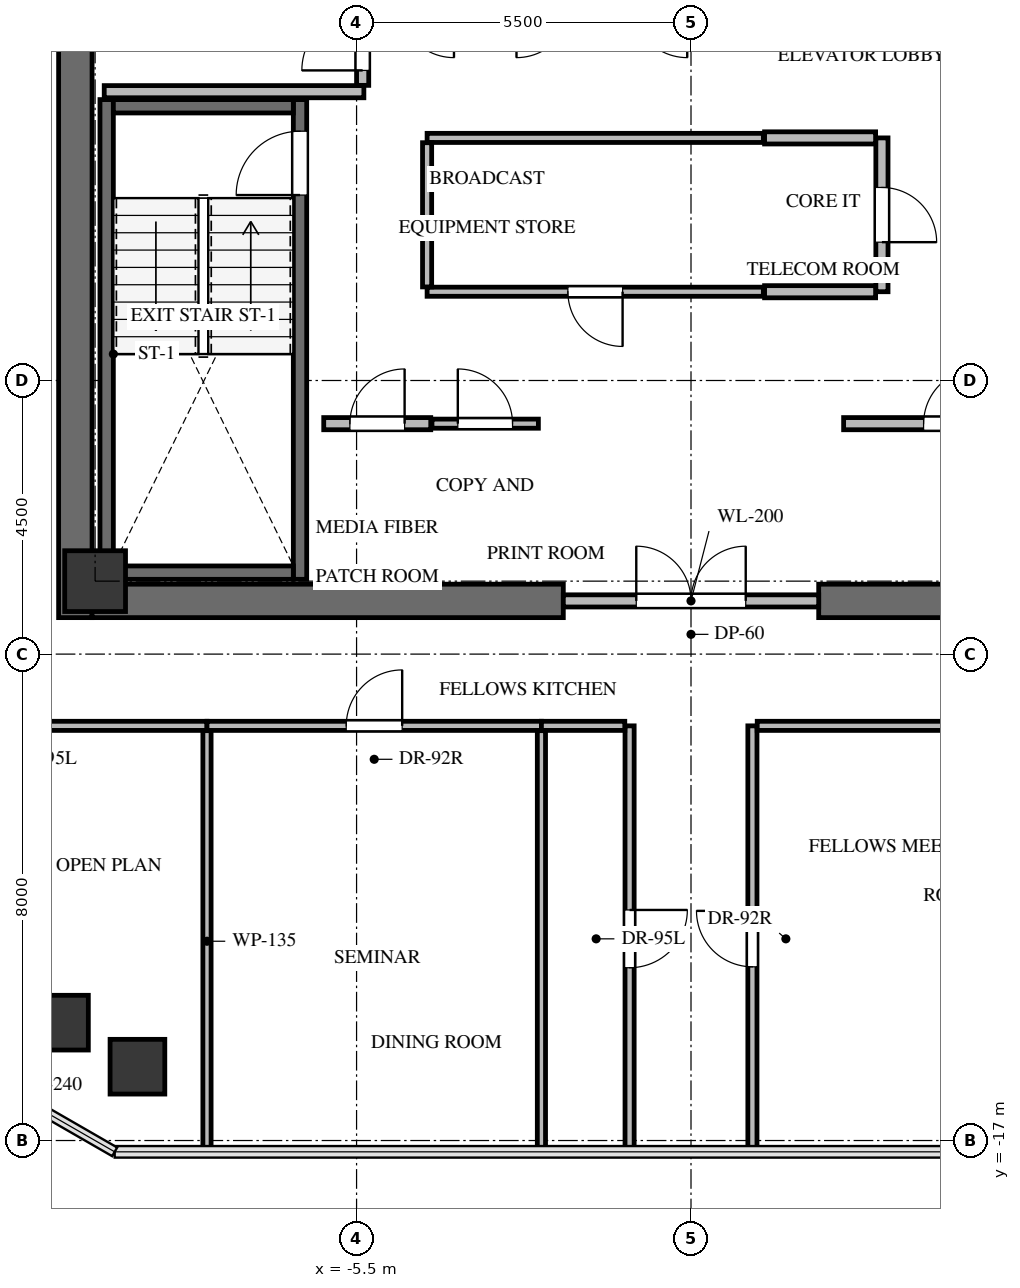
"""IFC4 building model, lengths in metres.
Left out: names, types, materials, properties, quantities, classifications, styles, units other than length and angle.
Written with IfcOpenShell. Run it as: python <this file> out.ifc"""

import sys

from ifc_helpers import new_model, si_unit, direction, frame, frame_2d, origin, origin_2d, place, context, subcontext, project, spatial, rectangle, extrude, source, transform, mapped, element, fill, save


model = new_model("IFC4")
c1 = context("Model", 3, precision=1e-05, world=origin(), true_north=direction((0.0, 1.0)))
c2 = subcontext(c1, "Body", "Model", "MODEL_VIEW")
j1 = project(units=[si_unit("LENGTHUNIT", "METRE"), si_unit("PLANEANGLEUNIT", "RADIAN")], contexts=[c1])
p1 = place(None, origin())
s1 = spatial("IfcSite", under=j1, at=p1, CompositionType="ELEMENT")
p2 = place(p1, origin())
s2 = spatial("IfcBuilding", under=s1, at=p2, CompositionType="ELEMENT")
p3 = place(p2, frame((0.0, 0.0, 258.1)))
s3 = spatial("IfcBuildingStorey", under=s2, at=p3, CompositionType="ELEMENT", Elevation=258.1)
p4 = place(p3, frame((-10.125, -8.4, 0.0), z_axis=(0.0, 0.0, 1.0), x_axis=(0.0, 1.0, 0.0)))
e1 = element("IfcWall", 1, at=p4, inside=s3, PredefinedType="SHEAR", context=c2, shape_type="SweptSolid", body=[
    extrude(rectangle(XDim=16.8, YDim=0.55, at=frame_2d((8.4, 0.0))), origin(), (0.0, 0.0, 1.0), 3.4),
])
for number, where, z_axis, x_axis in (
    (2, (-9.85, -8.125, 0.0), (0.0, 0.0, 1.0), (1.0, 0.0, 0.0)),
    (3, (2.1, -8.125, 0.0), (0.0, 0.0, 1.0), (1.0, 0.0, 0.0)),
):
    element("IfcWall", number, at=place(p3, frame(where, z_axis=z_axis, x_axis=x_axis)), inside=s3, PredefinedType="SHEAR", context=c2, shape_type="SweptSolid", body=[
        extrude(rectangle(XDim=7.75, YDim=0.55, at=frame_2d((3.875, 0.0))), origin(), (0.0, 0.0, 1.0), 3.4),
    ])
p5 = place(p3, frame((-6.43, -7.77, -0.24), z_axis=(0.0, 0.0, 1.0), x_axis=(0.0, 1.0, 0.0)))
e4 = element("IfcWall", 4, at=p5, inside=s3, PredefinedType="SHEAR", context=c2, shape_type="SweptSolid", body=[
    extrude(rectangle(XDim=7.89, YDim=0.22, at=frame_2d((3.945, 0.0))), origin(), (0.0, 0.0, 1.0), 3.4),
])
p6 = place(p5, frame((6.32, 0.0, 0.0)))
e5 = element("IfcOpeningElement", 5, at=p6, cuts=e4, PredefinedType="OPENING", context=c2, shape_type="SweptSolid", body=[
    extrude(rectangle(XDim=1.05, YDim=2.15, at=frame_2d((0.525, 1.075))), frame((0.0, 0.12, 0.0), z_axis=(0.0, -1.0, 0.0), x_axis=(1.0, 0.0, 0.0)), (0.0, 0.0, 1.0), 0.24),
])
p7 = place(p3, frame((-9.61, 0.12, -0.24), z_axis=(0.0, 0.0, 1.0), x_axis=(0.0, -1.0, 0.0)))
e6 = element("IfcWall", 6, at=p7, inside=s3, PredefinedType="SHEAR", context=c2, shape_type="SweptSolid", body=[
    extrude(rectangle(XDim=7.89, YDim=0.22, at=frame_2d((3.945, 0.0))), origin(), (0.0, 0.0, 1.0), 3.4),
])
for number, where, z_axis, x_axis in (
    (7, (-9.5, -7.66, -0.24), (0.0, 0.0, 1.0), (1.0, 0.0, 0.0)),
    (8, (-6.54, 0.01, -0.24), (0.0, 0.0, 1.0), (-1.0, 0.0, 0.0)),
):
    element("IfcWall", number, at=place(p3, frame(where, z_axis=z_axis, x_axis=x_axis)), inside=s3, PredefinedType="SHEAR", context=c2, shape_type="SweptSolid", body=[
        extrude(rectangle(XDim=2.96, YDim=0.22, at=frame_2d((1.48, 0.0))), origin(), (0.0, 0.0, 1.0), 3.4),
    ])
m1 = source(origin(), c2, "Body", "SweptSolid", [
    extrude(rectangle(XDim=1.0, YDim=1.0, at=origin_2d()), origin(), (0.0, 0.0, 1.0), 3.4),
])
p8 = place(p3, frame((-9.8, -7.8, -0.24), z_axis=(0.0, 0.0, 1.0), x_axis=(1.0, 0.0, 0.0)))
e9 = element("IfcColumn", 9, at=p8, inside=s3, PredefinedType="COLUMN", context=c2, shape_type="MappedRepresentation", body=[
    mapped(m1, transform((0.0, 0.0, 0.0), x_axis=(1.0, 0.0, 0.0), y_axis=(0.0, 1.0, 0.0), z_axis=(0.0, 0.0, 1.0), scale=1.0)),
])
m2 = source(origin(), c2, "Body", "SweptSolid", [
    extrude(rectangle(XDim=0.9, YDim=0.9, at=origin_2d()), origin(), (0.0, 0.0, 1.0), 3.4),
])
for number, where, z_axis, x_axis in (
    (10, (-10.361, -15.062, -0.24), (0.0, 0.0, 1.0), (1.0, 0.0, 0.0)),
    (11, (-9.104, -15.786, -0.24), (0.0, 0.0, 1.0), (1.0, 0.0, 0.0)),
):
    element("IfcColumn", number, at=place(p3, frame(where, z_axis=z_axis, x_axis=x_axis)), inside=s3, PredefinedType="COLUMN", context=c2, shape_type="MappedRepresentation", body=[
        mapped(m2, transform((0.0, 0.0, 0.0), x_axis=(1.0, 0.0, 0.0), y_axis=(0.0, 1.0, 0.0), z_axis=(0.0, 0.0, 1.0), scale=1.0)),
    ])
p9 = place(p3, frame((-2.1, -8.125, 0.0), z_axis=(0.0, 0.0, 1.0), x_axis=(1.0, 0.0, 0.0)))
e12 = element("IfcWall", 12, at=p9, inside=s3, PredefinedType="SOLIDWALL", context=c2, shape_type="SweptSolid", body=[
    extrude(rectangle(XDim=4.2, YDim=0.2, at=frame_2d((2.1, 0.0))), origin(), (0.0, 0.0, 1.0), 3.145),
])
p10 = place(p9, frame((1.2, 0.0, 0.0)))
e13 = element("IfcOpeningElement", 13, at=p10, cuts=e12, PredefinedType="OPENING", context=c2, shape_type="SweptSolid", body=[
    extrude(rectangle(XDim=1.8, YDim=2.15, at=frame_2d((0.9, 1.075))), frame((0.0, 0.11, 0.0), z_axis=(0.0, -1.0, 0.0), x_axis=(1.0, 0.0, 0.0)), (0.0, 0.0, 1.0), 0.22),
])
p11 = place(p3, frame((-9.65, 0.25, 0.0), z_axis=(0.0, 0.0, 1.0), x_axis=(1.0, 0.0, 0.0)))
e14 = element("IfcWall", 14, at=p11, inside=s3, PredefinedType="SOLIDWALL", context=c2, shape_type="SweptSolid", body=[
    extrude(rectangle(XDim=4.27, YDim=0.2, at=frame_2d((2.135, 0.0))), origin(), (0.0, 0.0, 1.0), 3.145),
])
p12 = place(p3, frame((-5.4, 0.354, 0.0), z_axis=(0.0, 0.0, 1.0), x_axis=(0.0, 1.0, 0.0)))
e15 = element("IfcWall", 15, at=p12, inside=s3, PredefinedType="SOLIDWALL", context=c2, shape_type="SweptSolid", body=[
    extrude(rectangle(XDim=4.026, YDim=0.2, at=frame_2d((2.013, 0.0))), origin(), (0.0, 0.0, 1.0), 3.145),
])
p13 = place(p12, frame((0.246, 0.0, 0.0)))
e16 = element("IfcOpeningElement", 16, at=p13, cuts=e15, PredefinedType="OPENING", context=c2, shape_type="SweptSolid", body=[
    extrude(rectangle(XDim=1.0, YDim=2.15, at=frame_2d((0.5, 1.075))), frame((0.0, 0.11, 0.0), z_axis=(0.0, -1.0, 0.0), x_axis=(1.0, 0.0, 0.0)), (0.0, 0.0, 1.0), 0.22),
])
p14 = place(p3, frame((-6.04, -5.21, 0.0), z_axis=(0.0, 0.0, 1.0), x_axis=(1.0, 0.0, 0.0)))
e17 = element("IfcWall", 17, at=p14, inside=s3, PredefinedType="SOLIDWALL", context=c2, shape_type="SweptSolid", body=[
    extrude(rectangle(XDim=1.76, YDim=0.2, at=frame_2d((0.88, 0.0))), origin(), (0.0, 0.0, 1.0), 3.145),
])
p15 = place(p14, frame((0.43, 0.0, 0.0)))
e18 = element("IfcOpeningElement", 18, at=p15, cuts=e17, PredefinedType="OPENING", context=c2, shape_type="SweptSolid", body=[
    extrude(rectangle(XDim=0.9, YDim=2.05, at=frame_2d((0.45, 1.025))), frame((0.0, 0.11, 0.0), z_axis=(0.0, -1.0, 0.0), x_axis=(1.0, 0.0, 0.0)), (0.0, 0.0, 1.0), 0.22),
])
p16 = place(p3, frame((-4.26, -5.21, 0.0), z_axis=(0.0, 0.0, 1.0), x_axis=(1.0, 0.0, 0.0)))
e19 = element("IfcWall", 19, at=p16, inside=s3, PredefinedType="PARTITIONING", context=c2, shape_type="SweptSolid", body=[
    extrude(rectangle(XDim=1.75, YDim=0.15, at=frame_2d((0.875, 0.0))), origin(), (0.0, 0.0, 1.0), 3.145),
])
p17 = place(p16, frame((0.425, 0.0, 0.0)))
e20 = element("IfcOpeningElement", 20, at=p17, cuts=e19, PredefinedType="OPENING", context=c2, shape_type="SweptSolid", body=[
    extrude(rectangle(XDim=0.9, YDim=2.05, at=frame_2d((0.45, 1.025))), frame((0.0, 0.085, 0.0), z_axis=(0.0, -1.0, 0.0), x_axis=(1.0, 0.0, 0.0)), (0.0, 0.0, 1.0), 0.17),
])
p18 = place(p3, frame((2.51, -5.21, 0.0), z_axis=(0.0, 0.0, 1.0), x_axis=(1.0, 0.0, 0.0)))
e21 = element("IfcWall", 21, at=p18, inside=s3, PredefinedType="SOLIDWALL", context=c2, shape_type="SweptSolid", body=[
    extrude(rectangle(XDim=3.53, YDim=0.2, at=frame_2d((1.765, 0.0))), origin(), (0.0, 0.0, 1.0), 3.145),
])
p19 = place(p18, frame((1.315, 0.0, 0.0)))
e22 = element("IfcOpeningElement", 22, at=p19, cuts=e21, PredefinedType="OPENING", context=c2, shape_type="SweptSolid", body=[
    extrude(rectangle(XDim=0.9, YDim=2.05, at=frame_2d((0.45, 1.025))), frame((0.0, 0.11, 0.0), z_axis=(0.0, -1.0, 0.0), x_axis=(1.0, 0.0, 0.0)), (0.0, 0.0, 1.0), 0.22),
])
p20 = place(p3, frame((1.19, -3.04, 0.0), z_axis=(0.0, 0.0, 1.0), x_axis=(-1.0, 0.0, 0.0)))
e23 = element("IfcWall", 23, at=p20, inside=s3, PredefinedType="PARTITIONING", context=c2, shape_type="SweptSolid", body=[
    extrude(rectangle(XDim=5.53, YDim=0.15, at=frame_2d((2.765, 0.0))), origin(), (0.0, 0.0, 1.0), 3.145),
])
p21 = place(p20, frame((2.315, 0.0, 0.0)))
e24 = element("IfcOpeningElement", 24, at=p21, cuts=e23, PredefinedType="OPENING", context=c2, shape_type="SweptSolid", body=[
    extrude(rectangle(XDim=0.9, YDim=2.05, at=frame_2d((0.45, 1.025))), frame((0.0, 0.085, 0.0), z_axis=(0.0, -1.0, 0.0), x_axis=(1.0, 0.0, 0.0)), (0.0, 0.0, 1.0), 0.17),
])
p22 = place(p3, frame((-4.34, -0.51, 0.0), z_axis=(0.0, 0.0, 1.0), x_axis=(1.0, 0.0, 0.0)))
e25 = element("IfcWall", 25, at=p22, inside=s3, PredefinedType="PARTITIONING", context=c2, shape_type="SweptSolid", body=[
    extrude(rectangle(XDim=5.53, YDim=0.15, at=frame_2d((2.765, 0.0))), origin(), (0.0, 0.0, 1.0), 3.145),
])
p23 = place(p3, frame((-4.34, -2.961, 0.0), z_axis=(0.0, 0.0, 1.0), x_axis=(0.0, 1.0, 0.0)))
e26 = element("IfcWall", 26, at=p23, inside=s3, PredefinedType="PARTITIONING", context=c2, shape_type="SweptSolid", body=[
    extrude(rectangle(XDim=2.372, YDim=0.15, at=frame_2d((1.186, 0.0))), origin(), (0.0, 0.0, 1.0), 3.145),
])
p24 = place(p3, frame((3.14, -0.51, 0.0), z_axis=(0.0, 0.0, 1.0), x_axis=(0.0, -1.0, 0.0)))
e27 = element("IfcWall", 27, at=p24, inside=s3, PredefinedType="SOLIDWALL", context=c2, shape_type="SweptSolid", body=[
    extrude(rectangle(XDim=2.53, YDim=0.2, at=frame_2d((1.265, 0.0))), origin(), (0.0, 0.0, 1.0), 3.145),
])
p25 = place(p24, frame((0.815, 0.0, 0.0)))
e28 = element("IfcOpeningElement", 28, at=p25, cuts=e27, PredefinedType="OPENING", context=c2, shape_type="SweptSolid", body=[
    extrude(rectangle(XDim=0.9, YDim=2.05, at=frame_2d((0.45, 1.025))), frame((0.0, 0.11, 0.0), z_axis=(0.0, -1.0, 0.0), x_axis=(1.0, 0.0, 0.0)), (0.0, 0.0, 1.0), 0.22),
])
for number, where, z_axis, x_axis in (
    (29, (3.036, -3.04, 0.0), (0.0, 0.0, 1.0), (-1.0, 0.0, 0.0)),
    (30, (1.21, -0.51, 0.0), (0.0, 0.0, 1.0), (1.0, 0.0, 0.0)),
):
    element("IfcWall", number, at=place(p3, frame(where, z_axis=z_axis, x_axis=x_axis)), inside=s3, PredefinedType="SOLIDWALL", context=c2, shape_type="SweptSolid", body=[
        extrude(rectangle(XDim=1.826, YDim=0.2, at=frame_2d((0.913, 0.0))), origin(), (0.0, 0.0, 1.0), 3.145),
    ])
p26 = place(p3, frame((-12.39, -10.18, 0.0), z_axis=(0.0, 0.0, 1.0), x_axis=(1.0, 0.0, 0.0)))
e31 = element("IfcWall", 31, at=p26, inside=s3, PredefinedType="PARTITIONING", context=c2, shape_type="SweptSolid", body=[
    extrude(rectangle(XDim=4.43, YDim=0.15, at=frame_2d((2.215, 0.0))), origin(), (0.0, 0.0, 1.0), 3.145),
])
p27 = place(p26, frame((0.35, 0.0, 0.0)))
e32 = element("IfcOpeningElement", 32, at=p27, cuts=e31, PredefinedType="OPENING", context=c2, shape_type="SweptSolid", body=[
    extrude(rectangle(XDim=0.95, YDim=2.1, at=frame_2d((0.475, 1.05))), frame((0.0, 0.085, 0.0), z_axis=(0.0, -1.0, 0.0), x_axis=(1.0, 0.0, 0.0)), (0.0, 0.0, 1.0), 0.17),
])
p28 = place(p3, frame((-7.96, -10.18, 0.0), z_axis=(0.0, 0.0, 1.0), x_axis=(1.0, 0.0, 0.0)))
e33 = element("IfcWall", 33, at=p28, inside=s3, PredefinedType="PARTITIONING", context=c2, shape_type="SweptSolid", body=[
    extrude(rectangle(XDim=5.5, YDim=0.15, at=frame_2d((2.75, 0.0))), origin(), (0.0, 0.0, 1.0), 2.401),
])
p29 = place(p28, frame((2.29, 0.0, 0.0)))
e34 = element("IfcOpeningElement", 34, at=p29, cuts=e33, PredefinedType="OPENING", context=c2, shape_type="SweptSolid", body=[
    extrude(rectangle(XDim=0.92, YDim=2.1, at=frame_2d((0.46, 1.05))), frame((0.0, 0.085, 0.0), z_axis=(0.0, -1.0, 0.0), x_axis=(1.0, 0.0, 0.0)), (0.0, 0.0, 1.0), 0.17),
])
p30 = place(p3, frame((-1.01, -10.18, 0.0), z_axis=(0.0, 0.0, 1.0), x_axis=(0.0, -1.0, 0.0)))
e35 = element("IfcWall", 35, at=p30, inside=s3, PredefinedType="PARTITIONING", context=c2, shape_type="SweptSolid", body=[
    extrude(rectangle(XDim=7.006, YDim=0.15, at=frame_2d((3.503, 0.0))), origin(), (0.0, 0.0, 1.0), 2.499),
])
p31 = place(p30, frame((3.028, 0.0, 0.0)))
e36 = element("IfcOpeningElement", 36, at=p31, cuts=e35, PredefinedType="OPENING", context=c2, shape_type="SweptSolid", body=[
    extrude(rectangle(XDim=0.95, YDim=2.1, at=frame_2d((0.475, 1.05))), frame((0.0, 0.085, 0.0), z_axis=(0.0, -1.0, 0.0), x_axis=(1.0, 0.0, 0.0)), (0.0, 0.0, 1.0), 0.17),
])
p32 = place(p3, frame((-2.46, -10.18, 0.0), z_axis=(0.0, 0.0, 1.0), x_axis=(1.0, 0.0, 0.0)))
e37 = element("IfcWall", 37, at=p32, inside=s3, PredefinedType="PARTITIONING", context=c2, shape_type="SweptSolid", body=[
    extrude(rectangle(XDim=1.371, YDim=0.15, at=frame_2d((0.686, 0.0))), origin(), (0.0, 0.0, 1.0), 3.145),
])
p33 = place(p3, frame((1.01, -17.186, 0.0), z_axis=(0.0, 0.0, 1.0), x_axis=(0.0, 1.0, 0.0)))
e38 = element("IfcWall", 38, at=p33, inside=s3, PredefinedType="PARTITIONING", context=c2, shape_type="SweptSolid", body=[
    extrude(rectangle(XDim=7.006, YDim=0.15, at=frame_2d((3.503, 0.0))), origin(), (0.0, 0.0, 1.0), 2.499),
])
p34 = place(p33, frame((3.043, 0.0, 0.0)))
e39 = element("IfcOpeningElement", 39, at=p34, cuts=e38, PredefinedType="OPENING", context=c2, shape_type="SweptSolid", body=[
    extrude(rectangle(XDim=0.92, YDim=2.1, at=frame_2d((0.46, 1.05))), frame((0.0, 0.085, 0.0), z_axis=(0.0, -1.0, 0.0), x_axis=(1.0, 0.0, 0.0)), (0.0, 0.0, 1.0), 0.17),
])
p35 = place(p3, frame((1.089, -10.18, 0.0), z_axis=(0.0, 0.0, 1.0), x_axis=(1.0, 0.0, 0.0)))
e40 = element("IfcWall", 40, at=p35, inside=s3, PredefinedType="PARTITIONING", context=c2, shape_type="SweptSolid", body=[
    extrude(rectangle(XDim=5.451, YDim=0.15, at=frame_2d((2.726, 0.0))), origin(), (0.0, 0.0, 1.0), 2.401),
])
p36 = place(p3, frame((-7.96, -10.259, 0.0), z_axis=(0.0, 0.0, 1.0), x_axis=(0.0, -1.0, 0.0)))
e41 = element("IfcWall", 41, at=p36, inside=s3, PredefinedType="PARTITIONING", context=c2, shape_type="SweptSolid", body=[
    extrude(rectangle(XDim=6.927, YDim=0.135, at=frame_2d((3.463, 0.0))), origin(), (0.0, 0.0, 1.0), 2.401),
])
p37 = place(p3, frame((-2.46, -10.259, 0.0), z_axis=(0.0, 0.0, 1.0), x_axis=(0.0, -1.0, 0.0)))
e42 = element("IfcWall", 42, at=p37, inside=s3, PredefinedType="PARTITIONING", context=c2, shape_type="SweptSolid", body=[
    extrude(rectangle(XDim=6.927, YDim=0.135, at=frame_2d((3.463, 0.0))), origin(), (0.0, 0.0, 1.0), 2.499),
])
m3 = source(origin(), c2, "Body", "SweptSolid", [
    extrude(rectangle(XDim=1.05, YDim=2.15, at=frame_2d((0.525, 1.075))), frame((0.0, 0.025, 0.0), z_axis=(0.0, -1.0, 0.0), x_axis=(1.0, 0.0, 0.0)), (0.0, 0.0, 1.0), 0.05),
])
p38 = place(p6, origin())
e43 = element("IfcDoor", 43, at=p38, inside=s3, OperationType="SINGLE_SWING_LEFT", PredefinedType="DOOR", context=c2, shape_type="MappedRepresentation", body=[
    mapped(m3, transform((0.0, 0.0, 0.0), x_axis=(1.0, 0.0, 0.0), y_axis=(0.0, 1.0, 0.0), z_axis=(0.0, 0.0, 1.0), scale=1.0)),
])
fill(e5, e43)
m4 = source(origin(), c2, "Body", "SweptSolid", [
    extrude(rectangle(XDim=1.8, YDim=2.15, at=frame_2d((0.9, 1.075))), frame((0.0, 0.025, 0.0), z_axis=(0.0, -1.0, 0.0), x_axis=(1.0, 0.0, 0.0)), (0.0, 0.0, 1.0), 0.05),
])
p39 = place(p10, origin())
e44 = element("IfcDoor", 44, at=p39, inside=s3, OperationType="DOUBLE_DOOR_SINGLE_SWING", PredefinedType="DOOR", context=c2, shape_type="MappedRepresentation", body=[
    mapped(m4, transform((0.0, 0.0, 0.0), x_axis=(1.0, 0.0, 0.0), y_axis=(0.0, 1.0, 0.0), z_axis=(0.0, 0.0, 1.0), scale=1.0)),
])
fill(e13, e44)
m5 = source(origin(), c2, "Body", "SweptSolid", [
    extrude(rectangle(XDim=1.0, YDim=2.15, at=frame_2d((0.5, 1.075))), frame((0.0, 0.025, 0.0), z_axis=(0.0, -1.0, 0.0), x_axis=(1.0, 0.0, 0.0)), (0.0, 0.0, 1.0), 0.05),
])
p40 = place(p13, origin())
e45 = element("IfcDoor", 45, at=p40, inside=s3, OperationType="SINGLE_SWING_LEFT", PredefinedType="DOOR", context=c2, shape_type="MappedRepresentation", body=[
    mapped(m5, transform((0.0, 0.0, 0.0), x_axis=(1.0, 0.0, 0.0), y_axis=(0.0, 1.0, 0.0), z_axis=(0.0, 0.0, 1.0), scale=1.0)),
])
fill(e16, e45)
m6 = source(origin(), c2, "Body", "SweptSolid", [
    extrude(rectangle(XDim=0.9, YDim=2.05, at=frame_2d((0.45, 1.025))), frame((0.0, 0.025, 0.0), z_axis=(0.0, -1.0, 0.0), x_axis=(1.0, 0.0, 0.0)), (0.0, 0.0, 1.0), 0.05),
])
p41 = place(p15, origin())
e46 = element("IfcDoor", 46, at=p41, inside=s3, OperationType="SINGLE_SWING_RIGHT", PredefinedType="DOOR", context=c2, shape_type="MappedRepresentation", body=[
    mapped(m6, transform((0.0, 0.0, 0.0), x_axis=(1.0, 0.0, 0.0), y_axis=(0.0, 1.0, 0.0), z_axis=(0.0, 0.0, 1.0), scale=1.0)),
])
fill(e18, e46)
m7 = source(origin(), c2, "Body", "SweptSolid", [
    extrude(rectangle(XDim=0.9, YDim=2.05, at=frame_2d((0.45, 1.025))), frame((0.0, 0.025, 0.0), z_axis=(0.0, -1.0, 0.0), x_axis=(1.0, 0.0, 0.0)), (0.0, 0.0, 1.0), 0.05),
])
p42 = place(p17, origin())
e47 = element("IfcDoor", 47, at=p42, inside=s3, OperationType="SINGLE_SWING_LEFT", PredefinedType="DOOR", context=c2, shape_type="MappedRepresentation", body=[
    mapped(m7, transform((0.0, 0.0, 0.0), x_axis=(1.0, 0.0, 0.0), y_axis=(0.0, 1.0, 0.0), z_axis=(0.0, 0.0, 1.0), scale=1.0)),
])
fill(e20, e47)
p43 = place(p19, origin())
e48 = element("IfcDoor", 48, at=p43, inside=s3, OperationType="SINGLE_SWING_RIGHT", PredefinedType="DOOR", context=c2, shape_type="MappedRepresentation", body=[
    mapped(m6, transform((0.0, 0.0, 0.0), x_axis=(1.0, 0.0, 0.0), y_axis=(0.0, 1.0, 0.0), z_axis=(0.0, 0.0, 1.0), scale=1.0)),
])
fill(e22, e48)
p44 = place(p21, origin())
e49 = element("IfcDoor", 49, at=p44, inside=s3, OperationType="SINGLE_SWING_LEFT", PredefinedType="DOOR", context=c2, shape_type="MappedRepresentation", body=[
    mapped(m7, transform((0.0, 0.0, 0.0), x_axis=(1.0, 0.0, 0.0), y_axis=(0.0, 1.0, 0.0), z_axis=(0.0, 0.0, 1.0), scale=1.0)),
])
fill(e24, e49)
p45 = place(p25, origin())
e50 = element("IfcDoor", 50, at=p45, inside=s3, OperationType="SINGLE_SWING_RIGHT", PredefinedType="DOOR", context=c2, shape_type="MappedRepresentation", body=[
    mapped(m6, transform((0.0, 0.0, 0.0), x_axis=(1.0, 0.0, 0.0), y_axis=(0.0, 1.0, 0.0), z_axis=(0.0, 0.0, 1.0), scale=1.0)),
])
fill(e28, e50)
m8 = source(origin(), c2, "Body", "SweptSolid", [
    extrude(rectangle(XDim=0.92, YDim=2.1, at=frame_2d((0.46, 1.05))), frame((0.0, 0.025, 0.0), z_axis=(0.0, -1.0, 0.0), x_axis=(1.0, 0.0, 0.0)), (0.0, 0.0, 1.0), 0.05),
])
p46 = place(p29, origin())
e51 = element("IfcDoor", 51, at=p46, inside=s3, OperationType="SINGLE_SWING_RIGHT", PredefinedType="DOOR", context=c2, shape_type="MappedRepresentation", body=[
    mapped(m8, transform((0.0, 0.0, 0.0), x_axis=(1.0, 0.0, 0.0), y_axis=(0.0, 1.0, 0.0), z_axis=(0.0, 0.0, 1.0), scale=1.0)),
])
fill(e34, e51)
m9 = source(origin(), c2, "Body", "SweptSolid", [
    extrude(rectangle(XDim=0.95, YDim=2.1, at=frame_2d((0.475, 1.05))), frame((0.0, 0.025, 0.0), z_axis=(0.0, -1.0, 0.0), x_axis=(1.0, 0.0, 0.0)), (0.0, 0.0, 1.0), 0.05),
])
p47 = place(p31, origin())
e52 = element("IfcDoor", 52, at=p47, inside=s3, OperationType="SINGLE_SWING_LEFT", PredefinedType="DOOR", context=c2, shape_type="MappedRepresentation", body=[
    mapped(m9, transform((0.0, 0.0, 0.0), x_axis=(1.0, 0.0, 0.0), y_axis=(0.0, 1.0, 0.0), z_axis=(0.0, 0.0, 1.0), scale=1.0)),
])
fill(e36, e52)
p48 = place(p34, origin())
e53 = element("IfcDoor", 53, at=p48, inside=s3, OperationType="SINGLE_SWING_RIGHT", PredefinedType="DOOR", context=c2, shape_type="MappedRepresentation", body=[
    mapped(m8, transform((0.0, 0.0, 0.0), x_axis=(1.0, 0.0, 0.0), y_axis=(0.0, 1.0, 0.0), z_axis=(0.0, 0.0, 1.0), scale=1.0)),
])
fill(e39, e53)
save(model, sys.argv[1])
